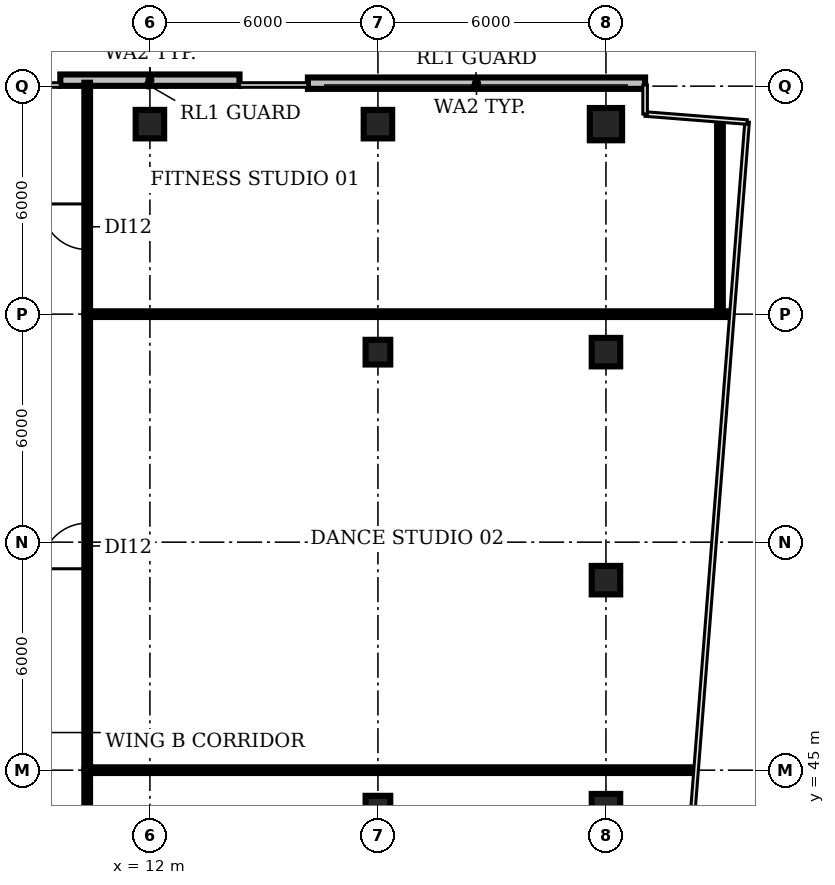
"""IFC4 building model, lengths in metres.
Left out: names, types, materials, properties, quantities, classifications, styles, units other than length and angle.
Written with IfcOpenShell. Run it as: python <this file> out.ifc"""

import sys

from ifc_helpers import new_model, si_unit, direction, frame, frame_2d, origin, origin_2d, place, context, subcontext, project, spatial, rectangle, circle, extrude, element, fill, save


model = new_model("IFC4")
c1 = context("Model", 3, precision=1e-05, world=origin(), true_north=direction((0.0, 1.0)))
c2 = subcontext(c1, "Body", "Model", "MODEL_VIEW")
j1 = project(units=[si_unit("LENGTHUNIT", "METRE"), si_unit("PLANEANGLEUNIT", "RADIAN")], contexts=[c1])
p1 = place(None, origin())
s1 = spatial("IfcSite", under=j1, at=p1, CompositionType="ELEMENT")
p2 = place(p1, origin())
s2 = spatial("IfcBuilding", under=s1, at=p2, CompositionType="ELEMENT")
p3 = place(p2, frame((0.0, 0.0, 268.4)))
s3 = spatial("IfcBuildingStorey", under=s2, at=p3, CompositionType="ELEMENT", Elevation=268.4)
p4 = place(p3, frame((12.0, 62.0, 0.0), z_axis=(0.0, 0.0, 1.0), x_axis=(1.0, 0.0, 0.0)))
e1 = element("IfcColumn", 1, at=p4, inside=s3, PredefinedType="COLUMN", context=c2, shape_type="SweptSolid", body=[
    extrude(rectangle(XDim=0.75, YDim=0.75, at=origin_2d()), origin(), (0.0, 0.0, 1.0), 3.8),
])
for number, where, z_axis, x_axis in (
    (2, (18.0, 44.0, 0.0), (0.0, 0.0, 1.0), (1.0, 0.0, 0.0)),
    (3, (18.0, 56.0, 0.0), (0.0, 0.0, 1.0), (1.0, 0.0, 0.0)),
):
    element("IfcColumn", number, at=place(p3, frame(where, z_axis=z_axis, x_axis=x_axis)), inside=s3, PredefinedType="COLUMN", context=c2, shape_type="SweptSolid", body=[
        extrude(rectangle(XDim=0.65, YDim=0.65, at=origin_2d()), origin(), (0.0, 0.0, 1.0), 3.8),
    ])
for number, where, z_axis, x_axis in (
    (4, (18.0, 62.0, 0.0), (0.0, 0.0, 1.0), (1.0, 0.0, 0.0)),
    (5, (24.0, 44.0, 0.0), (0.0, 0.0, 1.0), (1.0, 0.0, 0.0)),
    (6, (24.0, 50.0, 0.0), (0.0, 0.0, 1.0), (1.0, 0.0, 0.0)),
    (7, (24.0, 56.0, 0.0), (0.0, 0.0, 1.0), (1.0, 0.0, 0.0)),
):
    element("IfcColumn", number, at=place(p3, frame(where, z_axis=z_axis, x_axis=x_axis)), inside=s3, PredefinedType="COLUMN", context=c2, shape_type="SweptSolid", body=[
        extrude(rectangle(XDim=0.75, YDim=0.75, at=origin_2d()), origin(), (0.0, 0.0, 1.0), 3.8),
    ])
p5 = place(p3, frame((24.0, 62.0, 0.0), z_axis=(0.0, 0.0, 1.0), x_axis=(1.0, 0.0, 0.0)))
e8 = element("IfcColumn", 8, at=p5, inside=s3, PredefinedType="COLUMN", context=c2, shape_type="SweptSolid", body=[
    extrude(circle(Radius=0.425, at=origin_2d()), origin(), (0.0, 0.0, 1.0), 3.8),
])
p6 = place(p3, frame((25.03, 63.078, 0.0), z_axis=(0.0, 0.0, 1.0), x_axis=(-1.0, 0.0, 0.0)))
e9 = element("IfcWall", 9, at=p6, inside=s3, PredefinedType="SOLIDWALL", context=c2, shape_type="SweptSolid", body=[
    extrude(rectangle(XDim=8.873, YDim=0.3, at=frame_2d((4.436, 0.0))), origin(), (0.0, 0.0, 1.0), 3.8),
])
p7 = place(p3, frame((14.357, 63.157, 0.0), z_axis=(0.0, 0.0, 1.0), x_axis=(-1.0, 0.0, 0.0)))
e10 = element("IfcWall", 10, at=p7, inside=s3, PredefinedType="SOLIDWALL", context=c2, shape_type="SweptSolid", body=[
    extrude(rectangle(XDim=4.715, YDim=0.3, at=frame_2d((2.357, 0.0))), origin(), (0.0, 0.0, 1.0), 3.8),
])
p8 = place(p3, frame((10.35, 39.0, 0.0), z_axis=(0.0, 0.0, 1.0), x_axis=(0.0, 1.0, 0.0)))
e11 = element("IfcWall", 11, at=p8, inside=s3, PredefinedType="PARTITIONING", context=c2, shape_type="SweptSolid", body=[
    extrude(rectangle(XDim=6.0, YDim=0.15, at=frame_2d((3.0, 0.0))), origin(), (0.0, 0.0, 1.0), 2.85),
])
p9 = place(p8, frame((2.3, 0.0, 0.0)))
e12 = element("IfcOpeningElement", 12, at=p9, cuts=e11, PredefinedType="OPENING", context=c2, shape_type="SweptSolid", body=[
    extrude(rectangle(XDim=1.2, YDim=2.1, at=frame_2d((0.6, 1.05))), frame((0.0, 0.085, 0.0), z_axis=(0.0, -1.0, 0.0), x_axis=(1.0, 0.0, 0.0)), (0.0, 0.0, 1.0), 0.17),
])
p10 = place(p3, frame((10.35, 45.0, 0.0), z_axis=(0.0, 0.0, 1.0), x_axis=(0.0, 1.0, 0.0)))
e13 = element("IfcWall", 13, at=p10, inside=s3, PredefinedType="PARTITIONING", context=c2, shape_type="SweptSolid", body=[
    extrude(rectangle(XDim=12.0, YDim=0.15, at=frame_2d((6.0, 0.0))), origin(), (0.0, 0.0, 1.0), 2.85),
])
p11 = place(p10, frame((5.3, 0.0, 0.0)))
e14 = element("IfcOpeningElement", 14, at=p11, cuts=e13, PredefinedType="OPENING", context=c2, shape_type="SweptSolid", body=[
    extrude(rectangle(XDim=1.2, YDim=2.1, at=frame_2d((0.6, 1.05))), frame((0.0, 0.085, 0.0), z_axis=(0.0, -1.0, 0.0), x_axis=(1.0, 0.0, 0.0)), (0.0, 0.0, 1.0), 0.17),
])
p12 = place(p3, frame((10.35, 45.0, 0.0), z_axis=(0.0, 0.0, 1.0), x_axis=(1.0, 0.0, 0.0)))
e15 = element("IfcWall", 15, at=p12, inside=s3, PredefinedType="PARTITIONING", context=c2, shape_type="SweptSolid", body=[
    extrude(rectangle(XDim=15.957, YDim=0.15, at=frame_2d((7.979, 0.0))), origin(), (0.0, 0.0, 1.0), 2.85),
])
p13 = place(p3, frame((10.35, 57.0, 0.0), z_axis=(0.0, 0.0, 1.0), x_axis=(0.0, 1.0, 0.0)))
e16 = element("IfcWall", 16, at=p13, inside=s3, PredefinedType="PARTITIONING", context=c2, shape_type="SweptSolid", body=[
    extrude(rectangle(XDim=6.09, YDim=0.15, at=frame_2d((3.045, 0.0))), origin(), (0.0, 0.0, 1.0), 2.85),
])
p14 = place(p13, frame((1.7, 0.0, 0.0)))
e17 = element("IfcOpeningElement", 17, at=p14, cuts=e16, PredefinedType="OPENING", context=c2, shape_type="SweptSolid", body=[
    extrude(rectangle(XDim=1.2, YDim=2.1, at=frame_2d((0.6, 1.05))), frame((0.0, 0.085, 0.0), z_axis=(0.0, -1.0, 0.0), x_axis=(1.0, 0.0, 0.0)), (0.0, 0.0, 1.0), 0.17),
])
p15 = place(p3, frame((10.35, 57.0, 0.0), z_axis=(0.0, 0.0, 1.0), x_axis=(1.0, 0.0, 0.0)))
e18 = element("IfcWall", 18, at=p15, inside=s3, PredefinedType="PARTITIONING", context=c2, shape_type="SweptSolid", body=[
    extrude(rectangle(XDim=16.906, YDim=0.15, at=frame_2d((8.453, 0.0))), origin(), (0.0, 0.0, 1.0), 2.85),
])
p16 = place(p3, frame((27.0, 57.0, 0.0), z_axis=(0.0, 0.0, 1.0), x_axis=(0.0, 1.0, 0.0)))
e19 = element("IfcWall", 19, at=p16, inside=s3, PredefinedType="PARTITIONING", context=c2, shape_type="SweptSolid", body=[
    extrude(rectangle(XDim=5.06, YDim=0.15, at=frame_2d((2.53, 0.0))), origin(), (0.0, 0.0, 1.0), 2.85),
])
p17 = place(p11, origin())
e20 = element("IfcDoor", 20, at=p17, inside=s3, OperationType="SINGLE_SWING_LEFT", PredefinedType="DOOR", context=c2, shape_type="SweptSolid", body=[
    extrude(rectangle(XDim=1.2, YDim=2.1, at=frame_2d((0.6, 1.05))), frame((0.0, 0.025, 0.0), z_axis=(0.0, -1.0, 0.0), x_axis=(1.0, 0.0, 0.0)), (0.0, 0.0, 1.0), 0.05),
])
fill(e14, e20)
p18 = place(p14, origin())
e21 = element("IfcDoor", 21, at=p18, inside=s3, OperationType="SINGLE_SWING_RIGHT", PredefinedType="DOOR", context=c2, shape_type="SweptSolid", body=[
    extrude(rectangle(XDim=1.2, YDim=2.1, at=frame_2d((0.6, 1.05))), frame((0.0, 0.025, 0.0), z_axis=(0.0, -1.0, 0.0), x_axis=(1.0, 0.0, 0.0)), (0.0, 0.0, 1.0), 0.05),
])
fill(e17, e21)
save(model, sys.argv[1])
